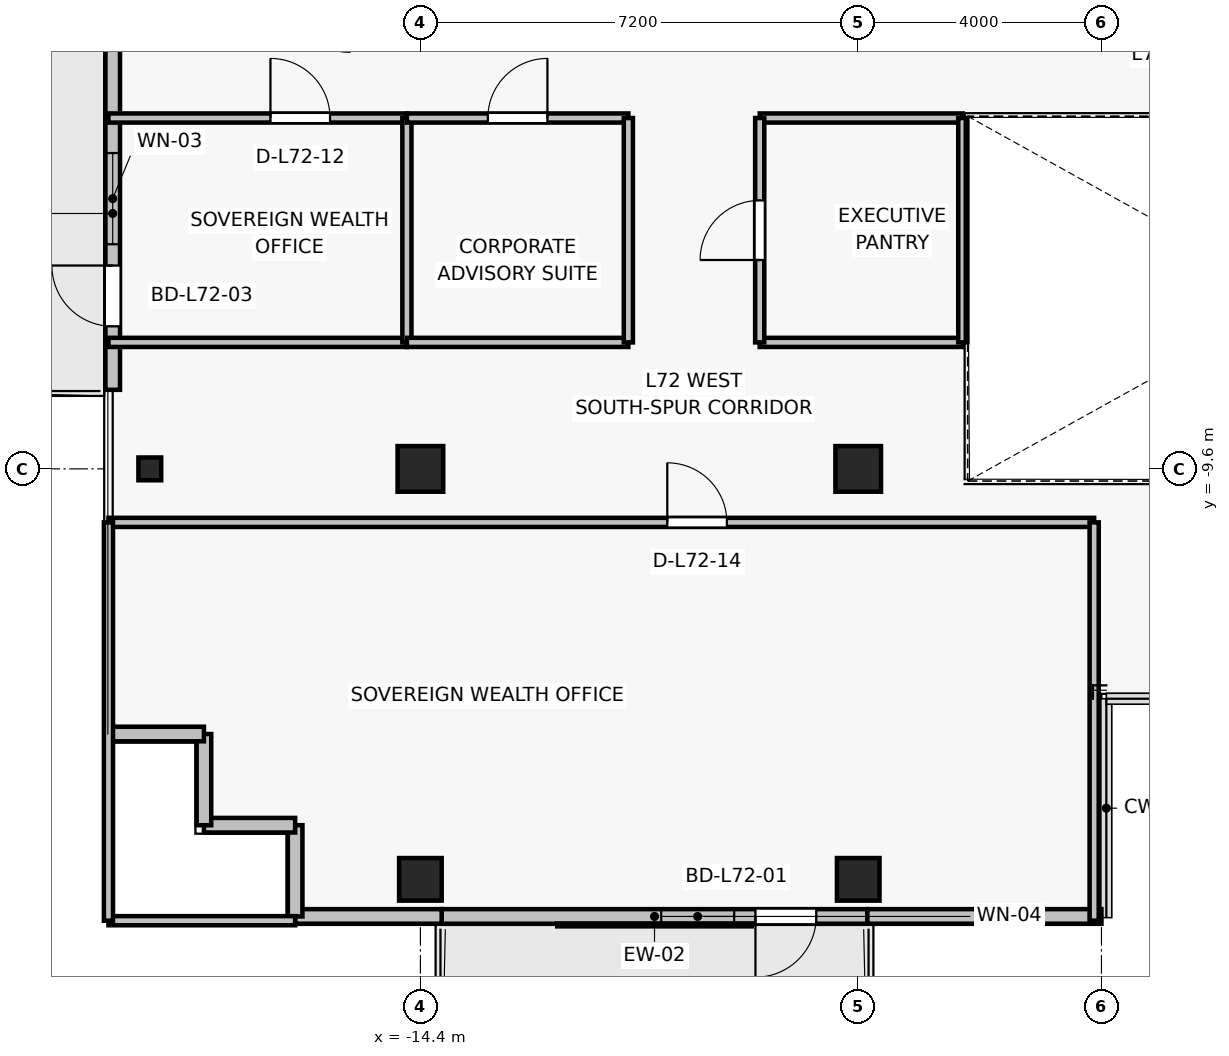
"""IFC4 building model, lengths in metres.
Left out: names, types, materials, properties, quantities, classifications, styles, units other than length and angle.
Written with IfcOpenShell. Run it as: python <this file> out.ifc"""

import sys

from ifc_helpers import new_model, si_unit, direction, frame, frame_2d, origin, origin_2d, place, context, subcontext, project, spatial, rectangle, i_section, extrude, source, transform, mapped, element, fill, save


model = new_model("IFC4")
c1 = context("Model", 3, precision=1e-05, world=origin(), true_north=direction((0.0, 1.0)))
c2 = subcontext(c1, "Body", "Model", "MODEL_VIEW")
j1 = project(units=[si_unit("LENGTHUNIT", "METRE"), si_unit("PLANEANGLEUNIT", "RADIAN")], contexts=[c1])
p1 = place(None, origin())
s1 = spatial("IfcSite", under=j1, at=p1, CompositionType="ELEMENT")
p2 = place(p1, origin())
s2 = spatial("IfcBuilding", under=s1, at=p2, CompositionType="ELEMENT")
p3 = place(p2, frame((0.0, 0.0, 255.1)))
s3 = spatial("IfcBuildingStorey", under=s2, at=p3, CompositionType="ELEMENT", Elevation=255.1)
for number, where, z_axis, x_axis in (
    (1, (-14.4, -9.6, 0.0), (0.0, 0.0, 1.0), (1.0, 0.0, 0.0)),
    (2, (-7.2, -9.6, 0.0), (0.0, 0.0, 1.0), (1.0, 0.0, 0.0)),
):
    element("IfcColumn", number, at=place(p3, frame(where, z_axis=z_axis, x_axis=x_axis)), inside=s3, PredefinedType="COLUMN", context=c2, shape_type="SweptSolid", body=[
        extrude(rectangle(XDim=0.75, YDim=0.75, at=origin_2d()), origin(), (0.0, 0.0, 1.0), 3.3),
    ])
for number, where, z_axis, x_axis in (
    (3, (-14.4, -16.35, 0.0), (0.0, 0.0, 1.0), (1.0, 0.0, 0.0)),
    (4, (-7.2, -16.35, 0.0), (0.0, 0.0, 1.0), (1.0, 0.0, 0.0)),
):
    element("IfcColumn", number, at=place(p3, frame(where, z_axis=z_axis, x_axis=x_axis)), inside=s3, PredefinedType="COLUMN", context=c2, shape_type="SweptSolid", body=[
        extrude(rectangle(XDim=0.7, YDim=0.7, at=origin_2d()), origin(), (0.0, 0.0, 1.0), 3.3),
    ])
p4 = place(p3, frame((-18.85, -9.6, 0.0), z_axis=(0.0, 0.0, 1.0), x_axis=(1.0, 0.0, 0.0)))
e5 = element("IfcColumn", 5, at=p4, inside=s3, PredefinedType="COLUMN", context=c2, shape_type="SweptSolid", body=[
    extrude(i_section(OverallWidth=0.375, OverallDepth=0.375, WebThickness=0.017, FlangeThickness=0.027, FilletRadius=0.015, at=origin_2d()), origin(), (0.0, 0.0, 1.0), 3.3),
])
p5 = place(p3, frame((-7.05, -16.96, 0.0), z_axis=(0.0, 0.0, 1.0), x_axis=(-1.0, 0.0, 0.0)))
e6 = element("IfcWall", 6, at=p5, inside=s3, PredefinedType="SOLIDWALL", context=c2, shape_type="SweptSolid", body=[
    extrude(rectangle(XDim=7.0, YDim=0.24, at=frame_2d((3.5, 0.0))), origin(), (0.0, 0.0, 1.0), 3.075),
])
p6 = place(p5, frame((0.84, 0.0, 0.0)))
e7 = element("IfcOpeningElement", 7, at=p6, cuts=e6, PredefinedType="OPENING", context=c2, shape_type="SweptSolid", body=[
    extrude(rectangle(XDim=1.0, YDim=2.2, at=frame_2d((0.5, 1.1))), frame((0.0, 0.13, 0.0), z_axis=(0.0, -1.0, 0.0), x_axis=(1.0, 0.0, 0.0)), (0.0, 0.0, 1.0), 0.26),
])
p7 = place(p5, frame((2.19, 0.0, 0.85)))
e8 = element("IfcOpeningElement", 8, at=p7, cuts=e6, PredefinedType="OPENING", context=c2, shape_type="SweptSolid", body=[
    extrude(rectangle(XDim=1.2, YDim=1.5, at=frame_2d((0.6, 0.75))), frame((0.0, 0.13, 0.0), z_axis=(0.0, -1.0, 0.0), x_axis=(1.0, 0.0, 0.0)), (0.0, 0.0, 1.0), 0.26),
])
p8 = place(p3, frame((-19.46, -8.3, 0.0), z_axis=(0.0, 0.0, 1.0), x_axis=(0.0, 1.0, 0.0)))
e9 = element("IfcWall", 9, at=p8, inside=s3, PredefinedType="SOLIDWALL", context=c2, shape_type="SweptSolid", body=[
    extrude(rectangle(XDim=5.8, YDim=0.24, at=frame_2d((2.9, 0.0))), origin(), (0.0, 0.0, 1.0), 2.705),
])
p9 = place(p8, frame((1.044, 0.0, 0.0)))
e10 = element("IfcOpeningElement", 10, at=p9, cuts=e9, PredefinedType="OPENING", context=c2, shape_type="SweptSolid", body=[
    extrude(rectangle(XDim=1.0, YDim=2.2, at=frame_2d((0.5, 1.1))), frame((0.0, 0.13, 0.0), z_axis=(0.0, -1.0, 0.0), x_axis=(1.0, 0.0, 0.0)), (0.0, 0.0, 1.0), 0.26),
])
p10 = place(p8, frame((2.394, 0.0, 0.85)))
e11 = element("IfcOpeningElement", 11, at=p10, cuts=e9, PredefinedType="OPENING", context=c2, shape_type="SweptSolid", body=[
    extrude(rectangle(XDim=1.5, YDim=1.6, at=frame_2d((0.75, 0.8))), frame((0.0, 0.13, 0.0), z_axis=(0.0, -1.0, 0.0), x_axis=(1.0, 0.0, 0.0)), (0.0, 0.0, 1.0), 0.26),
])
p11 = place(p3, frame((-7.05, -16.96, 0.0), z_axis=(0.0, 0.0, 1.0), x_axis=(1.0, 0.0, 0.0)))
e12 = element("IfcWall", 12, at=p11, inside=s3, PredefinedType="SOLIDWALL", context=c2, shape_type="SweptSolid", body=[
    extrude(rectangle(XDim=3.85, YDim=0.24, at=frame_2d((1.925, 0.0))), origin(), (0.0, 0.0, 1.0), 3.075),
])
p12 = place(p3, frame((-16.46, -16.96, 0.0), z_axis=(0.0, 0.0, 1.0), x_axis=(1.0, 0.0, 0.0)))
e13 = element("IfcWall", 13, at=p12, inside=s3, PredefinedType="SOLIDWALL", context=c2, shape_type="SweptSolid", body=[
    extrude(rectangle(XDim=2.41, YDim=0.24, at=frame_2d((1.205, 0.0))), origin(), (0.0, 0.0, 1.0), 3.075),
])
for number, where, z_axis, x_axis in (
    (14, (-16.46, -15.46, 0.0), (0.0, 0.0, 1.0), (0.0, -1.0, 0.0)),
    (15, (-17.96, -15.46, 0.0), (0.0, 0.0, 1.0), (1.0, 0.0, 0.0)),
    (16, (-17.96, -13.96, 0.0), (0.0, 0.0, 1.0), (0.0, -1.0, 0.0)),
    (17, (-19.46, -13.96, 0.0), (0.0, 0.0, 1.0), (1.0, 0.0, 0.0)),
):
    element("IfcWall", number, at=place(p3, frame(where, z_axis=z_axis, x_axis=x_axis)), inside=s3, PredefinedType="SOLIDWALL", context=c2, shape_type="SweptSolid", body=[
        extrude(rectangle(XDim=1.5, YDim=0.24, at=frame_2d((0.75, 0.0))), origin(), (0.0, 0.0, 1.0), 3.075),
    ])
p13 = place(p3, frame((-14.622, -7.52, 0.0), z_axis=(0.0, 0.0, 1.0), x_axis=(-1.0, 0.0, 0.0)))
e18 = element("IfcWall", 18, at=p13, inside=s3, PredefinedType="PARTITIONING", context=c2, shape_type="SweptSolid", body=[
    extrude(rectangle(XDim=4.908, YDim=0.15, at=frame_2d((2.454, 0.0))), origin(), (0.0, 0.0, 1.0), 2.615),
])
p14 = place(p3, frame((-19.53, -3.83, 0.0), z_axis=(0.0, 0.0, 1.0), x_axis=(1.0, 0.0, 0.0)))
e19 = element("IfcWall", 19, at=p14, inside=s3, PredefinedType="PARTITIONING", context=c2, shape_type="SweptSolid", body=[
    extrude(rectangle(XDim=4.908, YDim=0.15, at=frame_2d((2.454, 0.0))), origin(), (0.0, 0.0, 1.0), 2.615),
])
p15 = place(p14, frame((2.664, 0.0, 0.0)))
e20 = element("IfcOpeningElement", 20, at=p15, cuts=e19, PredefinedType="OPENING", context=c2, shape_type="SweptSolid", body=[
    extrude(rectangle(XDim=0.98, YDim=2.15, at=frame_2d((0.49, 1.075))), frame((0.0, 0.085, 0.0), z_axis=(0.0, -1.0, 0.0), x_axis=(1.0, 0.0, 0.0)), (0.0, 0.0, 1.0), 0.17),
])
p16 = place(p3, frame((-14.622, -3.83, 0.0), z_axis=(0.0, 0.0, 1.0), x_axis=(0.0, -1.0, 0.0)))
e21 = element("IfcWall", 21, at=p16, inside=s3, PredefinedType="PARTITIONING", context=c2, shape_type="SweptSolid", body=[
    extrude(rectangle(XDim=3.69, YDim=0.15, at=frame_2d((1.845, 0.0))), origin(), (0.0, 0.0, 1.0), 2.615),
])
p17 = place(p3, frame((-10.98, -7.52, 0.0), z_axis=(0.0, 0.0, 1.0), x_axis=(-1.0, 0.0, 0.0)))
e22 = element("IfcWall", 22, at=p17, inside=s3, PredefinedType="PARTITIONING", context=c2, shape_type="SweptSolid", body=[
    extrude(rectangle(XDim=3.642, YDim=0.15, at=frame_2d((1.821, 0.0))), origin(), (0.0, 0.0, 1.0), 2.615),
])
p18 = place(p3, frame((-14.622, -3.83, 0.0), z_axis=(0.0, 0.0, 1.0), x_axis=(1.0, 0.0, 0.0)))
e23 = element("IfcWall", 23, at=p18, inside=s3, PredefinedType="PARTITIONING", context=c2, shape_type="SweptSolid", body=[
    extrude(rectangle(XDim=3.642, YDim=0.15, at=frame_2d((1.821, 0.0))), origin(), (0.0, 0.0, 1.0), 2.615),
])
p19 = place(p18, frame((1.331, 0.0, 0.0)))
e24 = element("IfcOpeningElement", 24, at=p19, cuts=e23, PredefinedType="OPENING", context=c2, shape_type="SweptSolid", body=[
    extrude(rectangle(XDim=0.98, YDim=2.15, at=frame_2d((0.49, 1.075))), frame((0.0, 0.085, 0.0), z_axis=(0.0, -1.0, 0.0), x_axis=(1.0, 0.0, 0.0)), (0.0, 0.0, 1.0), 0.17),
])
p20 = place(p3, frame((-10.98, -3.83, 0.0), z_axis=(0.0, 0.0, 1.0), x_axis=(0.0, -1.0, 0.0)))
e25 = element("IfcWall", 25, at=p20, inside=s3, PredefinedType="PARTITIONING", context=c2, shape_type="SweptSolid", body=[
    extrude(rectangle(XDim=3.69, YDim=0.15, at=frame_2d((1.845, 0.0))), origin(), (0.0, 0.0, 1.0), 2.705),
])
p21 = place(p3, frame((-16.46, -17.03, 0.0), z_axis=(0.0, 0.0, 1.0), x_axis=(-1.0, 0.0, 0.0)))
e26 = element("IfcWall", 26, at=p21, inside=s3, PredefinedType="PARTITIONING", context=c2, shape_type="SweptSolid", body=[
    extrude(rectangle(XDim=3.07, YDim=0.15, at=frame_2d((1.535, 0.0))), origin(), (0.0, 0.0, 1.0), 3.075),
])
p22 = place(p3, frame((-19.53, -10.48, 0.0), z_axis=(0.0, 0.0, 1.0), x_axis=(1.0, 0.0, 0.0)))
e27 = element("IfcWall", 27, at=p22, inside=s3, PredefinedType="PARTITIONING", context=c2, shape_type="SweptSolid", body=[
    extrude(rectangle(XDim=16.21, YDim=0.15, at=frame_2d((8.105, 0.0))), origin(), (0.0, 0.0, 1.0), 2.615),
])
p23 = place(p22, frame((9.19, 0.0, 0.0)))
e28 = element("IfcOpeningElement", 28, at=p23, cuts=e27, PredefinedType="OPENING", context=c2, shape_type="SweptSolid", body=[
    extrude(rectangle(XDim=0.98, YDim=2.15, at=frame_2d((0.49, 1.075))), frame((0.0, 0.085, 0.0), z_axis=(0.0, -1.0, 0.0), x_axis=(1.0, 0.0, 0.0)), (0.0, 0.0, 1.0), 0.17),
])
for number, where, z_axis, x_axis in (
    (29, (-19.53, -17.03, 0.0), (0.0, 0.0, 1.0), (0.0, 1.0, 0.0)),
    (30, (-3.32, -10.48, 0.0), (0.0, 0.0, 1.0), (0.0, -1.0, 0.0)),
):
    element("IfcWall", number, at=place(p3, frame(where, z_axis=z_axis, x_axis=x_axis)), inside=s3, PredefinedType="PARTITIONING", context=c2, shape_type="SweptSolid", body=[
        extrude(rectangle(XDim=6.55, YDim=0.15, at=frame_2d((3.275, 0.0))), origin(), (0.0, 0.0, 1.0), 3.075),
    ])
for number, where, z_axis, x_axis in (
    (31, (-5.48, -7.52, 0.0), (0.0, 0.0, 1.0), (-1.0, 0.0, 0.0)),
    (32, (-8.82, -3.83, 0.0), (0.0, 0.0, 1.0), (1.0, 0.0, 0.0)),
):
    element("IfcWall", number, at=place(p3, frame(where, z_axis=z_axis, x_axis=x_axis)), inside=s3, PredefinedType="PARTITIONING", context=c2, shape_type="SweptSolid", body=[
        extrude(rectangle(XDim=3.34, YDim=0.15, at=frame_2d((1.67, 0.0))), origin(), (0.0, 0.0, 1.0), 2.615),
    ])
p24 = place(p3, frame((-8.82, -7.52, 0.0), z_axis=(0.0, 0.0, 1.0), x_axis=(0.0, 1.0, 0.0)))
e33 = element("IfcWall", 33, at=p24, inside=s3, PredefinedType="PARTITIONING", context=c2, shape_type="SweptSolid", body=[
    extrude(rectangle(XDim=3.69, YDim=0.15, at=frame_2d((1.845, 0.0))), origin(), (0.0, 0.0, 1.0), 2.705),
])
p25 = place(p24, frame((1.355, 0.0, 0.0)))
e34 = element("IfcOpeningElement", 34, at=p25, cuts=e33, PredefinedType="OPENING", context=c2, shape_type="SweptSolid", body=[
    extrude(rectangle(XDim=0.98, YDim=2.15, at=frame_2d((0.49, 1.075))), frame((0.0, 0.085, 0.0), z_axis=(0.0, -1.0, 0.0), x_axis=(1.0, 0.0, 0.0)), (0.0, 0.0, 1.0), 0.17),
])
p26 = place(p3, frame((-5.48, -3.83, 0.0), z_axis=(0.0, 0.0, 1.0), x_axis=(0.0, -1.0, 0.0)))
e35 = element("IfcWall", 35, at=p26, inside=s3, PredefinedType="PARTITIONING", context=c2, shape_type="SweptSolid", body=[
    extrude(rectangle(XDim=3.69, YDim=0.15, at=frame_2d((1.845, 0.0))), origin(), (0.0, 0.0, 1.0), 3.075),
])
m1 = source(origin(), c2, "Body", "SweptSolid", [
    extrude(rectangle(XDim=1.0, YDim=2.2, at=frame_2d((0.5, 1.1))), frame((0.0, 0.025, 0.0), z_axis=(0.0, -1.0, 0.0), x_axis=(1.0, 0.0, 0.0)), (0.0, 0.0, 1.0), 0.05),
])
p27 = place(p6, origin())
e36 = element("IfcDoor", 36, at=p27, inside=s3, OperationType="SINGLE_SWING_RIGHT", PredefinedType="DOOR", context=c2, shape_type="MappedRepresentation", body=[
    mapped(m1, transform((0.0, 0.0, 0.0), x_axis=(1.0, 0.0, 0.0), y_axis=(0.0, 1.0, 0.0), z_axis=(0.0, 0.0, 1.0), scale=1.0)),
])
fill(e7, e36)
m2 = source(origin(), c2, "Body", "SweptSolid", [
    extrude(rectangle(XDim=1.2, YDim=1.5, at=frame_2d((0.6, 0.75))), frame((0.0, 0.03, 0.0), z_axis=(0.0, -1.0, 0.0), x_axis=(1.0, 0.0, 0.0)), (0.0, 0.0, 1.0), 0.06),
])
p28 = place(p7, origin())
e37 = element("IfcWindow", 37, at=p28, inside=s3, PartitioningType="SINGLE_PANEL", PredefinedType="WINDOW", context=c2, shape_type="MappedRepresentation", body=[
    mapped(m2, transform((0.0, 0.0, 0.0), x_axis=(1.0, 0.0, 0.0), y_axis=(0.0, 1.0, 0.0), z_axis=(0.0, 0.0, 1.0), scale=1.0)),
])
fill(e8, e37)
p29 = place(p9, origin())
e38 = element("IfcDoor", 38, at=p29, inside=s3, OperationType="SINGLE_SWING_RIGHT", PredefinedType="DOOR", context=c2, shape_type="MappedRepresentation", body=[
    mapped(m1, transform((0.0, 0.0, 0.0), x_axis=(1.0, 0.0, 0.0), y_axis=(0.0, 1.0, 0.0), z_axis=(0.0, 0.0, 1.0), scale=1.0)),
])
fill(e10, e38)
m3 = source(origin(), c2, "Body", "SweptSolid", [
    extrude(rectangle(XDim=1.5, YDim=1.6, at=frame_2d((0.75, 0.8))), frame((0.0, 0.03, 0.0), z_axis=(0.0, -1.0, 0.0), x_axis=(1.0, 0.0, 0.0)), (0.0, 0.0, 1.0), 0.06),
])
p30 = place(p10, origin())
e39 = element("IfcWindow", 39, at=p30, inside=s3, PartitioningType="SINGLE_PANEL", PredefinedType="WINDOW", context=c2, shape_type="MappedRepresentation", body=[
    mapped(m3, transform((0.0, 0.0, 0.0), x_axis=(1.0, 0.0, 0.0), y_axis=(0.0, 1.0, 0.0), z_axis=(0.0, 0.0, 1.0), scale=1.0)),
])
fill(e11, e39)
m4 = source(origin(), c2, "Body", "SweptSolid", [
    extrude(rectangle(XDim=0.98, YDim=2.15, at=frame_2d((0.49, 1.075))), frame((0.0, 0.025, 0.0), z_axis=(0.0, -1.0, 0.0), x_axis=(1.0, 0.0, 0.0)), (0.0, 0.0, 1.0), 0.05),
])
p31 = place(p15, origin())
e40 = element("IfcDoor", 40, at=p31, inside=s3, OperationType="SINGLE_SWING_LEFT", PredefinedType="DOOR", context=c2, shape_type="MappedRepresentation", body=[
    mapped(m4, transform((0.0, 0.0, 0.0), x_axis=(1.0, 0.0, 0.0), y_axis=(0.0, 1.0, 0.0), z_axis=(0.0, 0.0, 1.0), scale=1.0)),
])
fill(e20, e40)
p32 = place(p19, origin())
e41 = element("IfcDoor", 41, at=p32, inside=s3, OperationType="SINGLE_SWING_RIGHT", PredefinedType="DOOR", context=c2, shape_type="MappedRepresentation", body=[
    mapped(m4, transform((0.0, 0.0, 0.0), x_axis=(1.0, 0.0, 0.0), y_axis=(0.0, 1.0, 0.0), z_axis=(0.0, 0.0, 1.0), scale=1.0)),
])
fill(e24, e41)
p33 = place(p23, origin())
e42 = element("IfcDoor", 42, at=p33, inside=s3, OperationType="SINGLE_SWING_LEFT", PredefinedType="DOOR", context=c2, shape_type="MappedRepresentation", body=[
    mapped(m4, transform((0.0, 0.0, 0.0), x_axis=(1.0, 0.0, 0.0), y_axis=(0.0, 1.0, 0.0), z_axis=(0.0, 0.0, 1.0), scale=1.0)),
])
fill(e28, e42)
p34 = place(p25, origin())
e43 = element("IfcDoor", 43, at=p34, inside=s3, OperationType="SINGLE_SWING_LEFT", PredefinedType="DOOR", context=c2, shape_type="MappedRepresentation", body=[
    mapped(m4, transform((0.0, 0.0, 0.0), x_axis=(1.0, 0.0, 0.0), y_axis=(0.0, 1.0, 0.0), z_axis=(0.0, 0.0, 1.0), scale=1.0)),
])
fill(e34, e43)
save(model, sys.argv[1])
